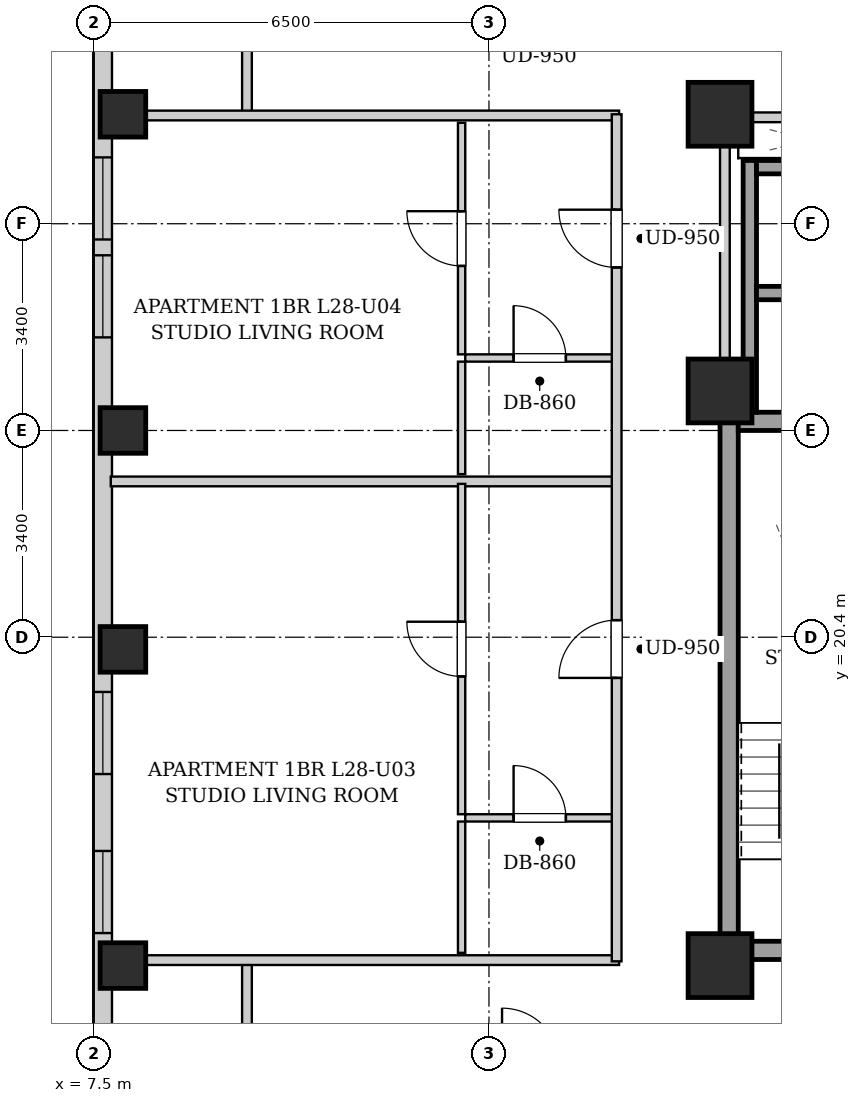
"""IFC4 building model, lengths in metres.
Left out: names, types, materials, properties, quantities, classifications, styles, units other than length and angle.
Written with IfcOpenShell. Run it as: python <this file> out.ifc"""

import sys

from ifc_helpers import new_model, si_unit, direction, frame, frame_2d, origin, origin_2d, place, context, subcontext, project, spatial, rectangle, extrude, element, fill, save


model = new_model("IFC4")
c1 = context("Model", 3, precision=1e-05, world=origin(), true_north=direction((0.0, 1.0)))
c2 = subcontext(c1, "Body", "Model", "MODEL_VIEW")
j1 = project(units=[si_unit("LENGTHUNIT", "METRE"), si_unit("PLANEANGLEUNIT", "RADIAN")], contexts=[c1])
p1 = place(None, origin())
s1 = spatial("IfcSite", under=j1, at=p1, CompositionType="ELEMENT")
p2 = place(p1, origin())
s2 = spatial("IfcBuilding", under=s1, at=p2, CompositionType="ELEMENT")
p3 = place(p2, frame((0.0, 0.0, 100.7)))
s3 = spatial("IfcBuildingStorey", under=s2, at=p3, CompositionType="ELEMENT", Elevation=100.7)
for number, where, z_axis, x_axis in (
    (1, (7.98, 15.0, 0.0), (0.0, 0.0, 1.0), (1.0, 0.0, 0.0)),
    (2, (7.98, 20.2, 0.0), (0.0, 0.0, 1.0), (1.0, 0.0, 0.0)),
    (3, (7.98, 23.8, 0.0), (0.0, 0.0, 1.0), (1.0, 0.0, 0.0)),
    (4, (7.98, 29.0, 0.0), (0.0, 0.0, 1.0), (1.0, 0.0, 0.0)),
):
    element("IfcColumn", number, at=place(p3, frame(where, z_axis=z_axis, x_axis=x_axis)), inside=s3, PredefinedType="COLUMN", context=c2, shape_type="SweptSolid", body=[
        extrude(rectangle(XDim=0.75, YDim=0.75, at=origin_2d()), origin(), (0.0, 0.0, 1.0), 3.2),
    ])
for number, where, z_axis, x_axis in (
    (5, (17.8, 15.0, 0.0), (0.0, 0.0, 1.0), (1.0, 0.0, 0.0)),
    (6, (17.8, 29.0, 0.0), (0.0, 0.0, 1.0), (1.0, 0.0, 0.0)),
    (7, (17.8, 24.45, 0.0), (0.0, 0.0, 1.0), (1.0, 0.0, 0.0)),
):
    element("IfcColumn", number, at=place(p3, frame(where, z_axis=z_axis, x_axis=x_axis)), inside=s3, PredefinedType="COLUMN", context=c2, shape_type="SweptSolid", body=[
        extrude(rectangle(XDim=1.05, YDim=1.05, at=origin_2d()), origin(), (0.0, 0.0, 1.0), 3.2),
    ])
p4 = place(p3, frame((7.65, 2.5, 0.0), z_axis=(0.0, 0.0, 1.0), x_axis=(0.0, 1.0, 0.0)))
e8 = element("IfcWall", 8, at=p4, inside=s3, PredefinedType="SOLIDWALL", context=c2, shape_type="SweptSolid", body=[
    extrude(rectangle(XDim=38.3, YDim=0.3, at=frame_2d((19.15, 0.0))), origin(), (0.0, 0.0, 1.0), 2.94),
])
p5 = place(p4, frame((3.38, 0.0, 0.55)))
e9 = element("IfcOpeningElement", 9, at=p5, cuts=e8, PredefinedType="OPENING", context=c2, shape_type="SweptSolid", body=[
    extrude(rectangle(XDim=1.35, YDim=1.2, at=frame_2d((0.675, 0.6))), frame((0.0, 0.16, 0.0), z_axis=(0.0, -1.0, 0.0), x_axis=(1.0, 0.0, 0.0)), (0.0, 0.0, 1.0), 0.32),
])
p6 = place(p4, frame((1.135, 0.0, 0.55)))
e10 = element("IfcOpeningElement", 10, at=p6, cuts=e8, PredefinedType="OPENING", context=c2, shape_type="SweptSolid", body=[
    extrude(rectangle(XDim=1.35, YDim=1.2, at=frame_2d((0.675, 0.6))), frame((0.0, 0.16, 0.0), z_axis=(0.0, -1.0, 0.0), x_axis=(1.0, 0.0, 0.0)), (0.0, 0.0, 1.0), 0.32),
])
p7 = place(p4, frame((33.946, 0.0, 0.55)))
e11 = element("IfcOpeningElement", 11, at=p7, cuts=e8, PredefinedType="OPENING", context=c2, shape_type="SweptSolid", body=[
    extrude(rectangle(XDim=1.35, YDim=1.2, at=frame_2d((0.675, 0.6))), frame((0.0, 0.16, 0.0), z_axis=(0.0, -1.0, 0.0), x_axis=(1.0, 0.0, 0.0)), (0.0, 0.0, 1.0), 0.32),
])
p8 = place(p4, frame((32.035, 0.0, 0.55)))
e12 = element("IfcOpeningElement", 12, at=p8, cuts=e8, PredefinedType="OPENING", context=c2, shape_type="SweptSolid", body=[
    extrude(rectangle(XDim=1.35, YDim=1.2, at=frame_2d((0.675, 0.6))), frame((0.0, 0.16, 0.0), z_axis=(0.0, -1.0, 0.0), x_axis=(1.0, 0.0, 0.0)), (0.0, 0.0, 1.0), 0.32),
])
p9 = place(p4, frame((15.65, 0.0, 0.55)))
e13 = element("IfcOpeningElement", 13, at=p9, cuts=e8, PredefinedType="OPENING", context=c2, shape_type="SweptSolid", body=[
    extrude(rectangle(XDim=1.35, YDim=1.2, at=frame_2d((0.675, 0.6))), frame((0.0, 0.16, 0.0), z_axis=(0.0, -1.0, 0.0), x_axis=(1.0, 0.0, 0.0)), (0.0, 0.0, 1.0), 0.32),
])
p10 = place(p4, frame((13.035, 0.0, 0.55)))
e14 = element("IfcOpeningElement", 14, at=p10, cuts=e8, PredefinedType="OPENING", context=c2, shape_type="SweptSolid", body=[
    extrude(rectangle(XDim=1.35, YDim=1.2, at=frame_2d((0.675, 0.6))), frame((0.0, 0.16, 0.0), z_axis=(0.0, -1.0, 0.0), x_axis=(1.0, 0.0, 0.0)), (0.0, 0.0, 1.0), 0.32),
])
p11 = place(p4, frame((22.831, 0.0, 0.55)))
e15 = element("IfcOpeningElement", 15, at=p11, cuts=e8, PredefinedType="OPENING", context=c2, shape_type="SweptSolid", body=[
    extrude(rectangle(XDim=1.35, YDim=1.2, at=frame_2d((0.675, 0.6))), frame((0.0, 0.16, 0.0), z_axis=(0.0, -1.0, 0.0), x_axis=(1.0, 0.0, 0.0)), (0.0, 0.0, 1.0), 0.32),
])
p12 = place(p4, frame((24.441, 0.0, 0.55)))
e16 = element("IfcOpeningElement", 16, at=p12, cuts=e8, PredefinedType="OPENING", context=c2, shape_type="SweptSolid", body=[
    extrude(rectangle(XDim=1.35, YDim=1.2, at=frame_2d((0.675, 0.6))), frame((0.0, 0.16, 0.0), z_axis=(0.0, -1.0, 0.0), x_axis=(1.0, 0.0, 0.0)), (0.0, 0.0, 1.0), 0.32),
])
p13 = place(p3, frame((17.95, 15.1, 0.0), z_axis=(0.0, 0.0, 1.0), x_axis=(0.0, 1.0, 0.0)))
e17 = element("IfcWall", 17, at=p13, inside=s3, PredefinedType="SHEAR", context=c2, shape_type="SweptSolid", body=[
    extrude(rectangle(XDim=9.0, YDim=0.3, at=frame_2d((4.5, 0.0))), origin(), (0.0, 0.0, 1.0), 2.94),
])
p14 = place(p3, frame((18.1, 23.95, 0.0), z_axis=(0.0, 0.0, 1.0), x_axis=(1.0, 0.0, 0.0)))
e18 = element("IfcWall", 18, at=p14, inside=s3, PredefinedType="SHEAR", context=c2, shape_type="SweptSolid", body=[
    extrude(rectangle(XDim=2.85, YDim=0.3, at=frame_2d((1.425, 0.0))), origin(), (0.0, 0.0, 1.0), 2.94),
])
p15 = place(p3, frame((18.1, 15.25, 0.0), z_axis=(0.0, 0.0, 1.0), x_axis=(1.0, 0.0, 0.0)))
e19 = element("IfcWall", 19, at=p15, inside=s3, PredefinedType="SHEAR", context=c2, shape_type="SweptSolid", body=[
    extrude(rectangle(XDim=2.85, YDim=0.3, at=frame_2d((1.425, 0.0))), origin(), (0.0, 0.0, 1.0), 2.94),
])
p16 = place(p15, frame((0.86, 0.0, 0.0)))
e20 = element("IfcOpeningElement", 20, at=p16, cuts=e19, PredefinedType="OPENING", context=c2, shape_type="SweptSolid", body=[
    extrude(rectangle(XDim=1.1, YDim=2.05, at=frame_2d((0.55, 1.025))), frame((0.0, 0.16, 0.0), z_axis=(0.0, -1.0, 0.0), x_axis=(1.0, 0.0, 0.0)), (0.0, 0.0, 1.0), 0.32),
])
p17 = place(p3, frame((18.29, 24.1, 0.0), z_axis=(0.0, 0.0, 1.0), x_axis=(0.0, 1.0, 0.0)))
e21 = element("IfcWall", 21, at=p17, inside=s3, PredefinedType="SHEAR", context=c2, shape_type="SweptSolid", body=[
    extrude(rectangle(XDim=4.14, YDim=0.22, at=frame_2d((2.07, 0.0))), origin(), (0.0, 0.0, 1.0), 2.94),
])
for number, where, z_axis, x_axis in (
    (22, (18.4, 26.06, 0.0), (0.0, 0.0, 1.0), (1.0, 0.0, 0.0)),
    (23, (18.4, 28.13, 0.0), (0.0, 0.0, 1.0), (1.0, 0.0, 0.0)),
):
    element("IfcWall", number, at=place(p3, frame(where, z_axis=z_axis, x_axis=x_axis)), inside=s3, PredefinedType="SHEAR", context=c2, shape_type="SweptSolid", body=[
        extrude(rectangle(XDim=1.9, YDim=0.22, at=frame_2d((0.95, 0.0))), origin(), (0.0, 0.0, 1.0), 2.94),
    ])
p18 = place(p3, frame((17.88, 24.12, 0.0), z_axis=(0.0, 0.0, 1.0), x_axis=(0.0, 1.0, 0.0)))
e24 = element("IfcWall", 24, at=p18, inside=s3, PredefinedType="PARTITIONING", context=c2, shape_type="SweptSolid", body=[
    extrude(rectangle(XDim=4.76, YDim=0.16, at=frame_2d((2.38, 0.0))), origin(), (0.0, 0.0, 1.0), 2.94),
])
p19 = place(p3, frame((17.96, 28.95, 0.0), z_axis=(0.0, 0.0, 1.0), x_axis=(1.0, 0.0, 0.0)))
e25 = element("IfcWall", 25, at=p19, inside=s3, PredefinedType="PARTITIONING", context=c2, shape_type="SweptSolid", body=[
    extrude(rectangle(XDim=4.29, YDim=0.16, at=frame_2d((2.145, 0.0))), origin(), (0.0, 0.0, 1.0), 2.313),
])
p20 = place(p19, frame((1.645, 0.0, 0.0)))
e26 = element("IfcOpeningElement", 26, at=p20, cuts=e25, PredefinedType="OPENING", context=c2, shape_type="SweptSolid", body=[
    extrude(rectangle(XDim=0.86, YDim=2.05, at=frame_2d((0.43, 1.025))), frame((0.0, 0.09, 0.0), z_axis=(0.0, -1.0, 0.0), x_axis=(1.0, 0.0, 0.0)), (0.0, 0.0, 1.0), 0.18),
])
for number, where, z_axis, x_axis in (
    (27, (10.02, 13.35, 0.0), (0.0, 0.0, 1.0), (0.0, 1.0, 0.0)),
    (28, (10.02, 28.98, 0.0), (0.0, 0.0, 1.0), (0.0, 1.0, 0.0)),
):
    element("IfcWall", number, at=place(p3, frame(where, z_axis=z_axis, x_axis=x_axis)), inside=s3, PredefinedType="PARTITIONING", context=c2, shape_type="SweptSolid", body=[
        extrude(rectangle(XDim=1.74, YDim=0.16, at=frame_2d((0.87, 0.0))), origin(), (0.0, 0.0, 1.0), 2.94),
    ])
for number, where, z_axis, x_axis in (
    (29, (7.78, 15.09, 0.0), (0.0, 0.0, 1.0), (1.0, 0.0, 0.0)),
    (30, (7.78, 28.98, 0.0), (0.0, 0.0, 1.0), (1.0, 0.0, 0.0)),
):
    element("IfcWall", number, at=place(p3, frame(where, z_axis=z_axis, x_axis=x_axis)), inside=s3, PredefinedType="PARTITIONING", context=c2, shape_type="SweptSolid", body=[
        extrude(rectangle(XDim=8.36, YDim=0.16, at=frame_2d((4.18, 0.0))), origin(), (0.0, 0.0, 1.0), 2.313),
    ])
p21 = place(p3, frame((7.78, 22.962, 0.0), z_axis=(0.0, 0.0, 1.0), x_axis=(1.0, 0.0, 0.0)))
e31 = element("IfcWall", 31, at=p21, inside=s3, PredefinedType="PARTITIONING", context=c2, shape_type="SweptSolid", body=[
    extrude(rectangle(XDim=8.28, YDim=0.16, at=frame_2d((4.14, 0.0))), origin(), (0.0, 0.0, 1.0), 2.94),
])
p22 = place(p3, frame((13.61, 17.429, 0.0), z_axis=(0.0, 0.0, 1.0), x_axis=(1.0, 0.0, 0.0)))
e32 = element("IfcWall", 32, at=p22, inside=s3, PredefinedType="PARTITIONING", context=c2, shape_type="SweptSolid", body=[
    extrude(rectangle(XDim=2.45, YDim=0.12, at=frame_2d((1.225, 0.0))), origin(), (0.0, 0.0, 1.0), 2.94),
])
p23 = place(p22, frame((0.795, 0.0, 0.0)))
e33 = element("IfcOpeningElement", 33, at=p23, cuts=e32, PredefinedType="OPENING", context=c2, shape_type="SweptSolid", body=[
    extrude(rectangle(XDim=0.86, YDim=2.05, at=frame_2d((0.43, 1.025))), frame((0.0, 0.07, 0.0), z_axis=(0.0, -1.0, 0.0), x_axis=(1.0, 0.0, 0.0)), (0.0, 0.0, 1.0), 0.14),
])
p24 = place(p3, frame((13.55, 15.21, 0.0), z_axis=(0.0, 0.0, 1.0), x_axis=(0.0, 1.0, 0.0)))
e34 = element("IfcWall", 34, at=p24, inside=s3, PredefinedType="PARTITIONING", context=c2, shape_type="SweptSolid", body=[
    extrude(rectangle(XDim=2.159, YDim=0.12, at=frame_2d((1.08, 0.0))), origin(), (0.0, 0.0, 1.0), 2.94),
])
p25 = place(p3, frame((13.55, 17.489, 0.0), z_axis=(0.0, 0.0, 1.0), x_axis=(0.0, 1.0, 0.0)))
e35 = element("IfcWall", 35, at=p25, inside=s3, PredefinedType="PARTITIONING", context=c2, shape_type="SweptSolid", body=[
    extrude(rectangle(XDim=5.433, YDim=0.12, at=frame_2d((2.717, 0.0))), origin(), (0.0, 0.0, 1.0), 2.94),
])
p26 = place(p25, frame((2.266, 0.0, 0.0)))
e36 = element("IfcOpeningElement", 36, at=p26, cuts=e35, PredefinedType="OPENING", context=c2, shape_type="SweptSolid", body=[
    extrude(rectangle(XDim=0.9, YDim=2.05, at=frame_2d((0.45, 1.025))), frame((0.0, 0.07, 0.0), z_axis=(0.0, -1.0, 0.0), x_axis=(1.0, 0.0, 0.0)), (0.0, 0.0, 1.0), 0.14),
])
p27 = place(p3, frame((13.61, 24.992, 0.0), z_axis=(0.0, 0.0, 1.0), x_axis=(1.0, 0.0, 0.0)))
e37 = element("IfcWall", 37, at=p27, inside=s3, PredefinedType="PARTITIONING", context=c2, shape_type="SweptSolid", body=[
    extrude(rectangle(XDim=2.45, YDim=0.12, at=frame_2d((1.225, 0.0))), origin(), (0.0, 0.0, 1.0), 2.94),
])
p28 = place(p27, frame((0.795, 0.0, 0.0)))
e38 = element("IfcOpeningElement", 38, at=p28, cuts=e37, PredefinedType="OPENING", context=c2, shape_type="SweptSolid", body=[
    extrude(rectangle(XDim=0.86, YDim=2.05, at=frame_2d((0.43, 1.025))), frame((0.0, 0.07, 0.0), z_axis=(0.0, -1.0, 0.0), x_axis=(1.0, 0.0, 0.0)), (0.0, 0.0, 1.0), 0.14),
])
p29 = place(p3, frame((13.55, 23.082, 0.0), z_axis=(0.0, 0.0, 1.0), x_axis=(0.0, 1.0, 0.0)))
e39 = element("IfcWall", 39, at=p29, inside=s3, PredefinedType="PARTITIONING", context=c2, shape_type="SweptSolid", body=[
    extrude(rectangle(XDim=1.85, YDim=0.12, at=frame_2d((0.925, 0.0))), origin(), (0.0, 0.0, 1.0), 2.94),
])
p30 = place(p3, frame((13.55, 25.052, 0.0), z_axis=(0.0, 0.0, 1.0), x_axis=(0.0, 1.0, 0.0)))
e40 = element("IfcWall", 40, at=p30, inside=s3, PredefinedType="PARTITIONING", context=c2, shape_type="SweptSolid", body=[
    extrude(rectangle(XDim=3.808, YDim=0.12, at=frame_2d((1.904, 0.0))), origin(), (0.0, 0.0, 1.0), 2.94),
])
p31 = place(p30, frame((1.454, 0.0, 0.0)))
e41 = element("IfcOpeningElement", 41, at=p31, cuts=e40, PredefinedType="OPENING", context=c2, shape_type="SweptSolid", body=[
    extrude(rectangle(XDim=0.9, YDim=2.05, at=frame_2d((0.45, 1.025))), frame((0.0, 0.07, 0.0), z_axis=(0.0, -1.0, 0.0), x_axis=(1.0, 0.0, 0.0)), (0.0, 0.0, 1.0), 0.14),
])
p32 = place(p3, frame((16.1, 15.07, 0.0), z_axis=(0.0, 0.0, 1.0), x_axis=(0.0, 1.0, 0.0)))
e42 = element("IfcWall", 42, at=p32, inside=s3, PredefinedType="PARTITIONING", context=c2, shape_type="SweptSolid", body=[
    extrude(rectangle(XDim=13.93, YDim=0.16, at=frame_2d((6.965, 0.0))), origin(), (0.0, 0.0, 1.0), 2.94),
])
p33 = place(p32, frame((4.661, 0.0, 0.0)))
e43 = element("IfcOpeningElement", 43, at=p33, cuts=e42, PredefinedType="OPENING", context=c2, shape_type="SweptSolid", body=[
    extrude(rectangle(XDim=0.95, YDim=2.1, at=frame_2d((0.475, 1.05))), frame((0.0, 0.09, 0.0), z_axis=(0.0, -1.0, 0.0), x_axis=(1.0, 0.0, 0.0)), (0.0, 0.0, 1.0), 0.18),
])
p34 = place(p32, frame((11.411, 0.0, 0.0)))
e44 = element("IfcOpeningElement", 44, at=p34, cuts=e42, PredefinedType="OPENING", context=c2, shape_type="SweptSolid", body=[
    extrude(rectangle(XDim=0.95, YDim=2.1, at=frame_2d((0.475, 1.05))), frame((0.0, 0.09, 0.0), z_axis=(0.0, -1.0, 0.0), x_axis=(1.0, 0.0, 0.0)), (0.0, 0.0, 1.0), 0.18),
])
p35 = place(p23, origin())
e45 = element("IfcDoor", 45, at=p35, inside=s3, OperationType="SINGLE_SWING_LEFT", PredefinedType="DOOR", context=c2, shape_type="SweptSolid", body=[
    extrude(rectangle(XDim=0.86, YDim=2.05, at=frame_2d((0.43, 1.025))), frame((0.0, 0.025, 0.0), z_axis=(0.0, -1.0, 0.0), x_axis=(1.0, 0.0, 0.0)), (0.0, 0.0, 1.0), 0.05),
])
fill(e33, e45)
p36 = place(p26, origin())
e46 = element("IfcDoor", 46, at=p36, inside=s3, OperationType="SINGLE_SWING_RIGHT", PredefinedType="DOOR", context=c2, shape_type="SweptSolid", body=[
    extrude(rectangle(XDim=0.9, YDim=2.05, at=frame_2d((0.45, 1.025))), frame((0.0, 0.025, 0.0), z_axis=(0.0, -1.0, 0.0), x_axis=(1.0, 0.0, 0.0)), (0.0, 0.0, 1.0), 0.05),
])
fill(e36, e46)
p37 = place(p28, origin())
e47 = element("IfcDoor", 47, at=p37, inside=s3, OperationType="SINGLE_SWING_LEFT", PredefinedType="DOOR", context=c2, shape_type="SweptSolid", body=[
    extrude(rectangle(XDim=0.86, YDim=2.05, at=frame_2d((0.43, 1.025))), frame((0.0, 0.025, 0.0), z_axis=(0.0, -1.0, 0.0), x_axis=(1.0, 0.0, 0.0)), (0.0, 0.0, 1.0), 0.05),
])
fill(e38, e47)
p38 = place(p31, origin())
e48 = element("IfcDoor", 48, at=p38, inside=s3, OperationType="SINGLE_SWING_RIGHT", PredefinedType="DOOR", context=c2, shape_type="SweptSolid", body=[
    extrude(rectangle(XDim=0.9, YDim=2.05, at=frame_2d((0.45, 1.025))), frame((0.0, 0.025, 0.0), z_axis=(0.0, -1.0, 0.0), x_axis=(1.0, 0.0, 0.0)), (0.0, 0.0, 1.0), 0.05),
])
fill(e41, e48)
p39 = place(p33, origin())
e49 = element("IfcDoor", 49, at=p39, inside=s3, OperationType="SINGLE_SWING_LEFT", PredefinedType="DOOR", context=c2, shape_type="SweptSolid", body=[
    extrude(rectangle(XDim=0.95, YDim=2.1, at=frame_2d((0.475, 1.05))), frame((0.0, 0.025, 0.0), z_axis=(0.0, -1.0, 0.0), x_axis=(1.0, 0.0, 0.0)), (0.0, 0.0, 1.0), 0.05),
])
fill(e43, e49)
p40 = place(p34, origin())
e50 = element("IfcDoor", 50, at=p40, inside=s3, OperationType="SINGLE_SWING_RIGHT", PredefinedType="DOOR", context=c2, shape_type="SweptSolid", body=[
    extrude(rectangle(XDim=0.95, YDim=2.1, at=frame_2d((0.475, 1.05))), frame((0.0, 0.025, 0.0), z_axis=(0.0, -1.0, 0.0), x_axis=(1.0, 0.0, 0.0)), (0.0, 0.0, 1.0), 0.05),
])
fill(e44, e50)
p41 = place(p9, origin())
e51 = element("IfcWindow", 51, at=p41, inside=s3, PartitioningType="SINGLE_PANEL", PredefinedType="WINDOW", context=c2, shape_type="SweptSolid", body=[
    extrude(rectangle(XDim=1.35, YDim=1.2, at=frame_2d((0.675, 0.6))), frame((0.0, 0.03, 0.0), z_axis=(0.0, -1.0, 0.0), x_axis=(1.0, 0.0, 0.0)), (0.0, 0.0, 1.0), 0.06),
])
fill(e13, e51)
p42 = place(p10, origin())
e52 = element("IfcWindow", 52, at=p42, inside=s3, PartitioningType="SINGLE_PANEL", PredefinedType="WINDOW", context=c2, shape_type="SweptSolid", body=[
    extrude(rectangle(XDim=1.35, YDim=1.2, at=frame_2d((0.675, 0.6))), frame((0.0, 0.03, 0.0), z_axis=(0.0, -1.0, 0.0), x_axis=(1.0, 0.0, 0.0)), (0.0, 0.0, 1.0), 0.06),
])
fill(e14, e52)
p43 = place(p11, origin())
e53 = element("IfcWindow", 53, at=p43, inside=s3, PartitioningType="SINGLE_PANEL", PredefinedType="WINDOW", context=c2, shape_type="SweptSolid", body=[
    extrude(rectangle(XDim=1.35, YDim=1.2, at=frame_2d((0.675, 0.6))), frame((0.0, 0.03, 0.0), z_axis=(0.0, -1.0, 0.0), x_axis=(1.0, 0.0, 0.0)), (0.0, 0.0, 1.0), 0.06),
])
fill(e15, e53)
p44 = place(p12, origin())
e54 = element("IfcWindow", 54, at=p44, inside=s3, PartitioningType="SINGLE_PANEL", PredefinedType="WINDOW", context=c2, shape_type="SweptSolid", body=[
    extrude(rectangle(XDim=1.35, YDim=1.2, at=frame_2d((0.675, 0.6))), frame((0.0, 0.03, 0.0), z_axis=(0.0, -1.0, 0.0), x_axis=(1.0, 0.0, 0.0)), (0.0, 0.0, 1.0), 0.06),
])
fill(e16, e54)
save(model, sys.argv[1])
